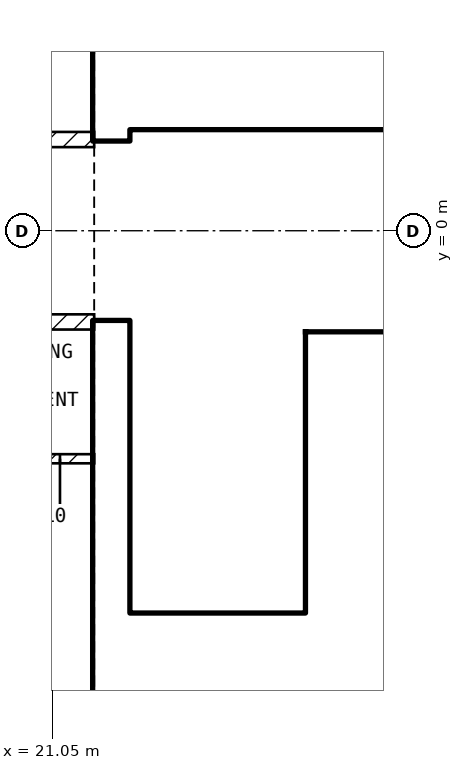
"""IFC4 building model, lengths in metres.
Left out: names, types, materials, properties, quantities, classifications, styles, units other than length and angle.
Written with IfcOpenShell. Run it as: python <this file> out.ifc"""

import sys

from ifc_helpers import new_model, si_unit, direction, frame, frame_2d, origin, place, context, subcontext, project, spatial, rectangle, extrude, element, fill, save


model = new_model("IFC4")
c1 = context("Model", 3, precision=1e-05, world=origin(), true_north=direction((0.0, 1.0)))
c2 = subcontext(c1, "Body", "Model", "MODEL_VIEW")
j1 = project(units=[si_unit("LENGTHUNIT", "METRE"), si_unit("PLANEANGLEUNIT", "RADIAN")], contexts=[c1])
p1 = place(None, origin())
s1 = spatial("IfcSite", under=j1, at=p1, CompositionType="ELEMENT")
p2 = place(p1, origin())
s2 = spatial("IfcBuilding", under=s1, at=p2, CompositionType="ELEMENT")
p3 = place(p2, frame((0.0, 0.0, 236.0)))
s3 = spatial("IfcBuildingStorey", under=s2, at=p3, CompositionType="ELEMENT", Elevation=236.0)
for number, where, z_axis, x_axis in (
    (1, (21.825, -8.1, 0.0), (0.0, 0.0, 1.0), (0.0, 1.0, 0.0)),
    (2, (21.825, 1.2, 0.0), (0.0, 0.0, 1.0), (0.0, 1.0, 0.0)),
):
    element("IfcWall", number, at=place(p3, frame(where, z_axis=z_axis, x_axis=x_axis)), inside=s3, PredefinedType="SHEAR", context=c2, shape_type="SweptSolid", body=[
        extrude(rectangle(XDim=6.9, YDim=0.45, at=frame_2d((3.45, 0.0))), origin(), (0.0, 0.0, 1.0), 3.25),
    ])
p4 = place(p3, frame((22.05, 1.45, 0.0), z_axis=(0.0, 0.0, 1.0), x_axis=(1.0, 0.0, 0.0)))
e3 = element("IfcWall", 3, at=p4, inside=s3, PredefinedType="SOLIDWALL", context=c2, shape_type="SweptSolid", body=[
    extrude(rectangle(XDim=11.3, YDim=0.2, at=frame_2d((5.65, 0.0))), origin(), (0.0, 0.0, 1.0), 3.25),
])
p5 = place(p4, frame((0.75, 0.0, 0.0)))
e4 = element("IfcOpeningElement", 4, at=p5, cuts=e3, PredefinedType="OPENING", context=c2, shape_type="SweptSolid", body=[
    extrude(rectangle(XDim=1.0, YDim=2.1, at=frame_2d((0.5, 1.05))), frame((0.0, 0.11, 0.0), z_axis=(0.0, -1.0, 0.0), x_axis=(1.0, 0.0, 0.0)), (0.0, 0.0, 1.0), 0.22),
])
p6 = place(p4, frame((3.25, 0.0, 0.0)))
e5 = element("IfcOpeningElement", 5, at=p6, cuts=e3, PredefinedType="OPENING", context=c2, shape_type="SweptSolid", body=[
    extrude(rectangle(XDim=1.0, YDim=2.1, at=frame_2d((0.5, 1.05))), frame((0.0, 0.11, 0.0), z_axis=(0.0, -1.0, 0.0), x_axis=(1.0, 0.0, 0.0)), (0.0, 0.0, 1.0), 0.22),
])
p7 = place(p4, frame((9.225, 0.0, 0.0)))
e6 = element("IfcOpeningElement", 6, at=p7, cuts=e3, PredefinedType="OPENING", context=c2, shape_type="SweptSolid", body=[
    extrude(rectangle(XDim=0.9, YDim=2.1, at=frame_2d((0.45, 1.05))), frame((0.0, 0.11, 0.0), z_axis=(0.0, -1.0, 0.0), x_axis=(1.0, 0.0, 0.0)), (0.0, 0.0, 1.0), 0.22),
])
p8 = place(p3, frame((24.5, -5.05, 0.0), z_axis=(0.0, 0.0, 1.0), x_axis=(0.0, 1.0, 0.0)))
e7 = element("IfcWall", 7, at=p8, inside=s3, PredefinedType="SOLIDWALL", context=c2, shape_type="SweptSolid", body=[
    extrude(rectangle(XDim=3.7, YDim=0.2, at=frame_2d((1.85, 0.0))), origin(), (0.0, 0.0, 1.0), 3.25),
])
p9 = place(p8, frame((0.1, 0.0, 0.0)))
e8 = element("IfcOpeningElement", 8, at=p9, cuts=e7, PredefinedType="OPENING", context=c2, shape_type="SweptSolid", body=[
    extrude(rectangle(XDim=0.8, YDim=2.1, at=frame_2d((0.4, 1.05))), frame((0.0, 0.11, 0.0), z_axis=(0.0, -1.0, 0.0), x_axis=(1.0, 0.0, 0.0)), (0.0, 0.0, 1.0), 0.22),
])
p10 = place(p3, frame((22.05, -5.15, 0.0), z_axis=(0.0, 0.0, 1.0), x_axis=(1.0, 0.0, 0.0)))
e9 = element("IfcWall", 9, at=p10, inside=s3, PredefinedType="SOLIDWALL", context=c2, shape_type="SweptSolid", body=[
    extrude(rectangle(XDim=6.3, YDim=0.2, at=frame_2d((3.15, 0.0))), origin(), (0.0, 0.0, 1.0), 3.25),
])
p11 = place(p10, frame((0.2, 0.0, 0.0)))
e10 = element("IfcOpeningElement", 10, at=p11, cuts=e9, PredefinedType="OPENING", context=c2, shape_type="SweptSolid", body=[
    extrude(rectangle(XDim=1.0, YDim=2.1, at=frame_2d((0.5, 1.05))), frame((0.0, 0.11, 0.0), z_axis=(0.0, -1.0, 0.0), x_axis=(1.0, 0.0, 0.0)), (0.0, 0.0, 1.0), 0.22),
])
p12 = place(p3, frame((24.6, -1.45, 0.0), z_axis=(0.0, 0.0, 1.0), x_axis=(1.0, 0.0, 0.0)))
e11 = element("IfcWall", 11, at=p12, inside=s3, PredefinedType="SOLIDWALL", context=c2, shape_type="SweptSolid", body=[
    extrude(rectangle(XDim=8.75, YDim=0.2, at=frame_2d((4.375, 0.0))), origin(), (0.0, 0.0, 1.0), 3.25),
])
p13 = place(p12, frame((0.4, 0.0, 0.0)))
e12 = element("IfcOpeningElement", 12, at=p13, cuts=e11, PredefinedType="OPENING", context=c2, shape_type="SweptSolid", body=[
    extrude(rectangle(XDim=1.0, YDim=2.1, at=frame_2d((0.5, 1.05))), frame((0.0, 0.11, 0.0), z_axis=(0.0, -1.0, 0.0), x_axis=(1.0, 0.0, 0.0)), (0.0, 0.0, 1.0), 0.22),
])
p14 = place(p12, frame((2.4, 0.0, 0.0)))
e13 = element("IfcOpeningElement", 13, at=p14, cuts=e11, PredefinedType="OPENING", context=c2, shape_type="SweptSolid", body=[
    extrude(rectangle(XDim=1.0, YDim=2.1, at=frame_2d((0.5, 1.05))), frame((0.0, 0.11, 0.0), z_axis=(0.0, -1.0, 0.0), x_axis=(1.0, 0.0, 0.0)), (0.0, 0.0, 1.0), 0.22),
])
p15 = place(p12, frame((4.4, 0.0, 0.0)))
e14 = element("IfcOpeningElement", 14, at=p15, cuts=e11, PredefinedType="OPENING", context=c2, shape_type="SweptSolid", body=[
    extrude(rectangle(XDim=1.0, YDim=2.1, at=frame_2d((0.5, 1.05))), frame((0.0, 0.11, 0.0), z_axis=(0.0, -1.0, 0.0), x_axis=(1.0, 0.0, 0.0)), (0.0, 0.0, 1.0), 0.22),
])
p16 = place(p12, frame((6.925, 0.0, 0.0)))
e15 = element("IfcOpeningElement", 15, at=p16, cuts=e11, PredefinedType="OPENING", context=c2, shape_type="SweptSolid", body=[
    extrude(rectangle(XDim=0.9, YDim=2.1, at=frame_2d((0.45, 1.05))), frame((0.0, 0.11, 0.0), z_axis=(0.0, -1.0, 0.0), x_axis=(1.0, 0.0, 0.0)), (0.0, 0.0, 1.0), 0.22),
])
p17 = place(p3, frame((24.6, -3.95, 0.0), z_axis=(0.0, 0.0, 1.0), x_axis=(1.0, 0.0, 0.0)))
e16 = element("IfcWall", 16, at=p17, inside=s3, PredefinedType="SOLIDWALL", context=c2, shape_type="SweptSolid", body=[
    extrude(rectangle(XDim=8.75, YDim=0.2, at=frame_2d((4.375, 0.0))), origin(), (0.0, 0.0, 1.0), 3.25),
])
p18 = place(p3, frame((4.4, 1.2, 0.0), z_axis=(0.0, 0.0, 1.0), x_axis=(1.0, 0.0, 0.0)))
e17 = element("IfcWall", 17, at=p18, inside=s3, PredefinedType="PARTITIONING", context=c2, shape_type="SweptSolid", body=[
    extrude(rectangle(XDim=17.2, YDim=0.2, at=frame_2d((8.6, 0.0))), origin(), (0.0, 0.0, 1.0), 3.25),
])
p19 = place(p18, frame((5.3, 0.0, 0.0)))
e18 = element("IfcOpeningElement", 18, at=p19, cuts=e17, PredefinedType="OPENING", context=c2, shape_type="SweptSolid", body=[
    extrude(rectangle(XDim=1.0, YDim=2.1, at=frame_2d((0.5, 1.05))), frame((0.0, 0.11, 0.0), z_axis=(0.0, -1.0, 0.0), x_axis=(1.0, 0.0, 0.0)), (0.0, 0.0, 1.0), 0.22),
])
p20 = place(p3, frame((21.6, -1.2, 0.0), z_axis=(0.0, 0.0, 1.0), x_axis=(-1.0, 0.0, 0.0)))
e19 = element("IfcWall", 19, at=p20, inside=s3, PredefinedType="PARTITIONING", context=c2, shape_type="SweptSolid", body=[
    extrude(rectangle(XDim=17.2, YDim=0.2, at=frame_2d((8.6, 0.0))), origin(), (0.0, 0.0, 1.0), 3.25),
])
p21 = place(p20, frame((10.3, 0.0, 0.0)))
e20 = element("IfcOpeningElement", 20, at=p21, cuts=e19, PredefinedType="OPENING", context=c2, shape_type="SweptSolid", body=[
    extrude(rectangle(XDim=1.0, YDim=2.1, at=frame_2d((0.5, 1.05))), frame((0.0, 0.11, 0.0), z_axis=(0.0, -1.0, 0.0), x_axis=(1.0, 0.0, 0.0)), (0.0, 0.0, 1.0), 0.22),
])
p22 = place(p3, frame((21.6, -3.0, 0.0), z_axis=(0.0, 0.0, 1.0), x_axis=(-1.0, 0.0, 0.0)))
e21 = element("IfcWall", 21, at=p22, inside=s3, PredefinedType="PARTITIONING", context=c2, shape_type="SweptSolid", body=[
    extrude(rectangle(XDim=1.8, YDim=0.12, at=frame_2d((0.9, 0.0))), origin(), (0.0, 0.0, 1.0), 3.25),
])
p23 = place(p22, frame((0.45, 0.0, 0.0)))
e22 = element("IfcOpeningElement", 22, at=p23, cuts=e21, PredefinedType="OPENING", context=c2, shape_type="SweptSolid", body=[
    extrude(rectangle(XDim=0.9, YDim=2.1, at=frame_2d((0.45, 1.05))), frame((0.0, 0.07, 0.0), z_axis=(0.0, -1.0, 0.0), x_axis=(1.0, 0.0, 0.0)), (0.0, 0.0, 1.0), 0.14),
])
p24 = place(p13, origin())
e23 = element("IfcDoor", 23, at=p24, inside=s3, OperationType="DOUBLE_DOOR_SLIDING", PredefinedType="DOOR", context=c2, shape_type="SweptSolid", body=[
    extrude(rectangle(XDim=1.0, YDim=2.1, at=frame_2d((0.5, 1.05))), frame((0.0, 0.025, 0.0), z_axis=(0.0, -1.0, 0.0), x_axis=(1.0, 0.0, 0.0)), (0.0, 0.0, 1.0), 0.05),
])
fill(e12, e23)
p25 = place(p11, origin())
e24 = element("IfcDoor", 24, at=p25, inside=s3, OperationType="SINGLE_SWING_LEFT", PredefinedType="DOOR", context=c2, shape_type="SweptSolid", body=[
    extrude(rectangle(XDim=1.0, YDim=2.1, at=frame_2d((0.5, 1.05))), frame((0.0, 0.025, 0.0), z_axis=(0.0, -1.0, 0.0), x_axis=(1.0, 0.0, 0.0)), (0.0, 0.0, 1.0), 0.05),
])
fill(e10, e24)
p26 = place(p5, origin())
e25 = element("IfcDoor", 25, at=p26, inside=s3, OperationType="SINGLE_SWING_LEFT", PredefinedType="DOOR", context=c2, shape_type="SweptSolid", body=[
    extrude(rectangle(XDim=1.0, YDim=2.1, at=frame_2d((0.5, 1.05))), frame((0.0, 0.025, 0.0), z_axis=(0.0, -1.0, 0.0), x_axis=(1.0, 0.0, 0.0)), (0.0, 0.0, 1.0), 0.05),
])
fill(e4, e25)
p27 = place(p9, origin())
e26 = element("IfcDoor", 26, at=p27, inside=s3, OperationType="SINGLE_SWING_LEFT", PredefinedType="DOOR", context=c2, shape_type="SweptSolid", body=[
    extrude(rectangle(XDim=0.8, YDim=2.1, at=frame_2d((0.4, 1.05))), frame((0.0, 0.025, 0.0), z_axis=(0.0, -1.0, 0.0), x_axis=(1.0, 0.0, 0.0)), (0.0, 0.0, 1.0), 0.05),
])
fill(e8, e26)
p28 = place(p6, origin())
e27 = element("IfcDoor", 27, at=p28, inside=s3, OperationType="SINGLE_SWING_LEFT", PredefinedType="DOOR", context=c2, shape_type="SweptSolid", body=[
    extrude(rectangle(XDim=1.0, YDim=2.1, at=frame_2d((0.5, 1.05))), frame((0.0, 0.025, 0.0), z_axis=(0.0, -1.0, 0.0), x_axis=(1.0, 0.0, 0.0)), (0.0, 0.0, 1.0), 0.05),
])
fill(e5, e27)
p29 = place(p23, origin())
e28 = element("IfcDoor", 28, at=p29, inside=s3, OperationType="SINGLE_SWING_LEFT", PredefinedType="DOOR", context=c2, shape_type="SweptSolid", body=[
    extrude(rectangle(XDim=0.9, YDim=2.1, at=frame_2d((0.45, 1.05))), frame((0.0, 0.025, 0.0), z_axis=(0.0, -1.0, 0.0), x_axis=(1.0, 0.0, 0.0)), (0.0, 0.0, 1.0), 0.05),
])
fill(e22, e28)
save(model, sys.argv[1])
